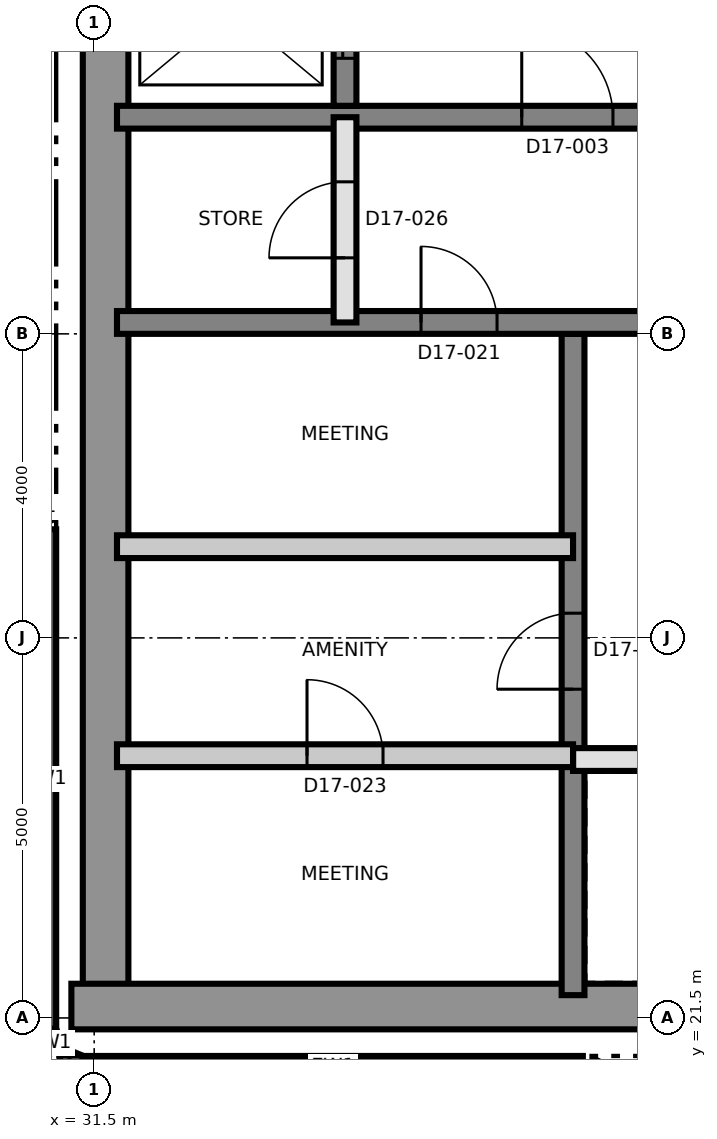
"""IFC4 building model, lengths in metres.
Left out: names, types, materials, properties, quantities, classifications, styles, units other than length and angle.
Written with IfcOpenShell. Run it as: python <this file> out.ifc"""

import sys

from ifc_helpers import new_model, si_unit, direction, frame, frame_2d, origin, place, context, subcontext, project, spatial, rectangle, extrude, element, fill, save


model = new_model("IFC4")
c1 = context("Model", 3, precision=1e-05, world=origin(), true_north=direction((0.0, 1.0)))
c2 = subcontext(c1, "Body", "Model", "MODEL_VIEW")
j1 = project(units=[si_unit("LENGTHUNIT", "METRE"), si_unit("PLANEANGLEUNIT", "RADIAN")], contexts=[c1])
p1 = place(None, origin())
s1 = spatial("IfcSite", under=j1, at=p1, CompositionType="ELEMENT")
p2 = place(p1, origin())
s2 = spatial("IfcBuilding", under=s1, at=p2, CompositionType="ELEMENT")
p3 = place(p2, frame((0.0, 0.0, 171.8)))
s3 = spatial("IfcBuildingStorey", under=s2, at=p3, CompositionType="ELEMENT", Elevation=171.8)
p4 = place(p3, frame((31.65, 21.8, 0.0), z_axis=(0.0, 0.0, 1.0), x_axis=(0.0, 1.0, 0.0)))
e1 = element("IfcWall", 1, at=p4, inside=s3, PredefinedType="SHEAR", context=c2, shape_type="SweptSolid", body=[
    extrude(rectangle(XDim=17.4, YDim=0.6, at=frame_2d((8.7, 0.0))), origin(), (0.0, 0.0, 1.0), 3.7),
])
p5 = place(p3, frame((31.2, 21.65, 0.0), z_axis=(0.0, 0.0, 1.0), x_axis=(1.0, 0.0, 0.0)))
e2 = element("IfcWall", 2, at=p5, inside=s3, PredefinedType="SHEAR", context=c2, shape_type="SweptSolid", body=[
    extrude(rectangle(XDim=27.0, YDim=0.6, at=frame_2d((13.5, 0.0))), origin(), (0.0, 0.0, 1.0), 3.7),
])
p6 = place(p3, frame((37.8, 21.8, 0.0), z_axis=(0.0, 0.0, 1.0), x_axis=(0.0, 1.0, 0.0)))
e3 = element("IfcWall", 3, at=p6, inside=s3, PredefinedType="SHEAR", context=c2, shape_type="SweptSolid", body=[
    extrude(rectangle(XDim=8.7, YDim=0.3, at=frame_2d((4.35, 0.0))), origin(), (0.0, 0.0, 1.0), 3.7),
])
p7 = place(p6, frame((4.025, 0.0, 0.0)))
e4 = element("IfcOpeningElement", 4, at=p7, cuts=e3, PredefinedType="OPENING", context=c2, shape_type="SweptSolid", body=[
    extrude(rectangle(XDim=1.0, YDim=2.1, at=frame_2d((0.5, 1.05))), frame((0.0, 0.16, 0.0), z_axis=(0.0, -1.0, 0.0), x_axis=(1.0, 0.0, 0.0)), (0.0, 0.0, 1.0), 0.32),
])
p8 = place(p3, frame((31.8, 30.65, 0.0), z_axis=(0.0, 0.0, 1.0), x_axis=(1.0, 0.0, 0.0)))
e5 = element("IfcWall", 5, at=p8, inside=s3, PredefinedType="SHEAR", context=c2, shape_type="SweptSolid", body=[
    extrude(rectangle(XDim=26.4, YDim=0.3, at=frame_2d((13.2, 0.0))), origin(), (0.0, 0.0, 1.0), 3.7),
])
p9 = place(p8, frame((24.7, 0.0, 0.0)))
e6 = element("IfcOpeningElement", 6, at=p9, cuts=e5, PredefinedType="OPENING", context=c2, shape_type="SweptSolid", body=[
    extrude(rectangle(XDim=1.0, YDim=2.1, at=frame_2d((0.5, 1.05))), frame((0.0, 0.16, 0.0), z_axis=(0.0, -1.0, 0.0), x_axis=(1.0, 0.0, 0.0)), (0.0, 0.0, 1.0), 0.32),
])
p10 = place(p8, frame((4.0, 0.0, 0.0)))
e7 = element("IfcOpeningElement", 7, at=p10, cuts=e5, PredefinedType="OPENING", context=c2, shape_type="SweptSolid", body=[
    extrude(rectangle(XDim=1.0, YDim=2.1, at=frame_2d((0.5, 1.05))), frame((0.0, 0.16, 0.0), z_axis=(0.0, -1.0, 0.0), x_axis=(1.0, 0.0, 0.0)), (0.0, 0.0, 1.0), 0.32),
])
p11 = place(p3, frame((31.8, 33.35, 0.0), z_axis=(0.0, 0.0, 1.0), x_axis=(1.0, 0.0, 0.0)))
e8 = element("IfcWall", 8, at=p11, inside=s3, PredefinedType="SHEAR", context=c2, shape_type="SweptSolid", body=[
    extrude(rectangle(XDim=26.4, YDim=0.3, at=frame_2d((13.2, 0.0))), origin(), (0.0, 0.0, 1.0), 3.7),
])
p12 = place(p11, frame((13.85, 0.0, 0.0)))
e9 = element("IfcOpeningElement", 9, at=p12, cuts=e8, PredefinedType="OPENING", context=c2, shape_type="SweptSolid", body=[
    extrude(rectangle(XDim=1.4, YDim=2.1, at=frame_2d((0.7, 1.05))), frame((0.0, 0.16, 0.0), z_axis=(0.0, -1.0, 0.0), x_axis=(1.0, 0.0, 0.0)), (0.0, 0.0, 1.0), 0.32),
])
p13 = place(p11, frame((5.325, 0.0, 0.0)))
e10 = element("IfcOpeningElement", 10, at=p13, cuts=e8, PredefinedType="OPENING", context=c2, shape_type="SweptSolid", body=[
    extrude(rectangle(XDim=1.2, YDim=2.1, at=frame_2d((0.6, 1.05))), frame((0.0, 0.16, 0.0), z_axis=(0.0, -1.0, 0.0), x_axis=(1.0, 0.0, 0.0)), (0.0, 0.0, 1.0), 0.32),
])
p14 = place(p11, frame((19.875, 0.0, 0.0)))
e11 = element("IfcOpeningElement", 11, at=p14, cuts=e8, PredefinedType="OPENING", context=c2, shape_type="SweptSolid", body=[
    extrude(rectangle(XDim=1.2, YDim=2.1, at=frame_2d((0.6, 1.05))), frame((0.0, 0.16, 0.0), z_axis=(0.0, -1.0, 0.0), x_axis=(1.0, 0.0, 0.0)), (0.0, 0.0, 1.0), 0.32),
])
p15 = place(p3, frame((34.8, 33.5, 0.0), z_axis=(0.0, 0.0, 1.0), x_axis=(0.0, 1.0, 0.0)))
e12 = element("IfcWall", 12, at=p15, inside=s3, PredefinedType="SHEAR", context=c2, shape_type="SweptSolid", body=[
    extrude(rectangle(XDim=2.55, YDim=0.3, at=frame_2d((1.275, 0.0))), origin(), (0.0, 0.0, 1.0), 3.7),
])
p16 = place(p15, frame((0.625, 0.0, 0.0)))
e13 = element("IfcOpeningElement", 13, at=p16, cuts=e12, PredefinedType="OPENING", context=c2, shape_type="SweptSolid", body=[
    extrude(rectangle(XDim=1.3, YDim=2.4, at=frame_2d((0.65, 1.2))), frame((0.0, 0.16, 0.0), z_axis=(0.0, -1.0, 0.0), x_axis=(1.0, 0.0, 0.0)), (0.0, 0.0, 1.0), 0.32),
])
p17 = place(p3, frame((30.85, 27.929, 0.0), z_axis=(0.0, 0.0, 1.0), x_axis=(0.0, -1.0, 0.0)))
e14 = element("IfcWall", 14, at=p17, inside=s3, PredefinedType="SOLIDWALL", context=c2, shape_type="SweptSolid", body=[
    extrude(rectangle(XDim=6.569, YDim=0.3, at=frame_2d((3.285, 0.0))), origin(), (0.0, 0.0, 1.0), 3.4),
])
for number, where, z_axis, x_axis in (
    (15, (30.861, 21.302, 0.0), (0.0, 0.0, 1.0), (0.383, -0.924, 0.0)),
    (16, (31.048, 20.967, 0.0), (0.0, 0.0, 1.0), (0.924, -0.383, 0.0)),
):
    element("IfcWall", number, at=place(p3, frame(where, z_axis=z_axis, x_axis=x_axis)), inside=s3, PredefinedType="SOLIDWALL", context=c2, shape_type="SweptSolid", body=[
        extrude(rectangle(XDim=0.275, YDim=0.3, at=frame_2d((0.138, 0.0))), origin(), (0.0, 0.0, 1.0), 3.4),
    ])
p18 = place(p3, frame((31.36, 20.85, 0.0), z_axis=(0.0, 0.0, 1.0), x_axis=(1.0, 0.0, 0.0)))
e17 = element("IfcWall", 17, at=p18, inside=s3, PredefinedType="SOLIDWALL", context=c2, shape_type="SweptSolid", body=[
    extrude(rectangle(XDim=6.569, YDim=0.3, at=frame_2d((3.285, 0.0))), origin(), (0.0, 0.0, 1.0), 3.4),
])
for number, where, z_axis, x_axis in (
    (18, (37.995, 20.834, 0.0), (0.0, 0.0, 1.0), (0.897, -0.442, 0.0)),
    (19, (30.613, 28.444, 0.0), (0.0, 0.0, 1.0), (0.442, -0.897, 0.0)),
):
    element("IfcWall", number, at=place(p3, frame(where, z_axis=z_axis, x_axis=x_axis)), inside=s3, PredefinedType="SOLIDWALL", context=c2, shape_type="SweptSolid", body=[
        extrude(rectangle(XDim=0.501, YDim=0.3, at=frame_2d((0.25, 0.0))), origin(), (0.0, 0.0, 1.0), 3.4),
    ])
p19 = place(p3, frame((37.8, 24.9, 0.0), z_axis=(0.0, 0.0, 1.0), x_axis=(1.0, 0.0, 0.0)))
e20 = element("IfcWall", 20, at=p19, inside=s3, PredefinedType="SOLIDWALL", context=c2, shape_type="SweptSolid", body=[
    extrude(rectangle(XDim=12.0, YDim=0.3, at=frame_2d((6.0, 0.0))), origin(), (0.0, 0.0, 1.0), 3.4),
])
p20 = place(p19, frame((1.05, 0.0, 0.0)))
e21 = element("IfcOpeningElement", 21, at=p20, cuts=e20, PredefinedType="OPENING", context=c2, shape_type="SweptSolid", body=[
    extrude(rectangle(XDim=0.9, YDim=2.1, at=frame_2d((0.45, 1.05))), frame((0.0, 0.16, 0.0), z_axis=(0.0, -1.0, 0.0), x_axis=(1.0, 0.0, 0.0)), (0.0, 0.0, 1.0), 0.32),
])
p21 = place(p19, frame((10.05, 0.0, 0.0)))
e22 = element("IfcOpeningElement", 22, at=p21, cuts=e20, PredefinedType="OPENING", context=c2, shape_type="SweptSolid", body=[
    extrude(rectangle(XDim=0.9, YDim=2.1, at=frame_2d((0.45, 1.05))), frame((0.0, 0.16, 0.0), z_axis=(0.0, -1.0, 0.0), x_axis=(1.0, 0.0, 0.0)), (0.0, 0.0, 1.0), 0.32),
])
p22 = place(p19, frame((3.95, 0.0, 0.0)))
e23 = element("IfcOpeningElement", 23, at=p22, cuts=e20, PredefinedType="OPENING", context=c2, shape_type="SweptSolid", body=[
    extrude(rectangle(XDim=1.1, YDim=2.4, at=frame_2d((0.55, 1.2))), frame((0.0, 0.16, 0.0), z_axis=(0.0, -1.0, 0.0), x_axis=(1.0, 0.0, 0.0)), (0.0, 0.0, 1.0), 0.32),
])
p23 = place(p19, frame((6.95, 0.0, 0.0)))
e24 = element("IfcOpeningElement", 24, at=p23, cuts=e20, PredefinedType="OPENING", context=c2, shape_type="SweptSolid", body=[
    extrude(rectangle(XDim=1.1, YDim=2.4, at=frame_2d((0.55, 1.2))), frame((0.0, 0.16, 0.0), z_axis=(0.0, -1.0, 0.0), x_axis=(1.0, 0.0, 0.0)), (0.0, 0.0, 1.0), 0.32),
])
p24 = place(p3, frame((31.8, 24.95, 0.0), z_axis=(0.0, 0.0, 1.0), x_axis=(1.0, 0.0, 0.0)))
e25 = element("IfcWall", 25, at=p24, inside=s3, PredefinedType="PARTITIONING", context=c2, shape_type="SweptSolid", body=[
    extrude(rectangle(XDim=6.0, YDim=0.3, at=frame_2d((3.0, 0.0))), origin(), (0.0, 0.0, 1.0), 3.4),
])
p25 = place(p24, frame((2.5, 0.0, 0.0)))
e26 = element("IfcOpeningElement", 26, at=p25, cuts=e25, PredefinedType="OPENING", context=c2, shape_type="SweptSolid", body=[
    extrude(rectangle(XDim=1.0, YDim=2.1, at=frame_2d((0.5, 1.05))), frame((0.0, 0.16, 0.0), z_axis=(0.0, -1.0, 0.0), x_axis=(1.0, 0.0, 0.0)), (0.0, 0.0, 1.0), 0.32),
])
p26 = place(p3, frame((31.8, 27.7, 0.0), z_axis=(0.0, 0.0, 1.0), x_axis=(1.0, 0.0, 0.0)))
e27 = element("IfcWall", 27, at=p26, inside=s3, PredefinedType="PARTITIONING", context=c2, shape_type="SweptSolid", body=[
    extrude(rectangle(XDim=6.0, YDim=0.3, at=frame_2d((3.0, 0.0))), origin(), (0.0, 0.0, 1.0), 3.4),
])
p27 = place(p3, frame((34.8, 30.65, 0.0), z_axis=(0.0, 0.0, 1.0), x_axis=(0.0, 1.0, 0.0)))
e28 = element("IfcWall", 28, at=p27, inside=s3, PredefinedType="SOLIDWALL", context=c2, shape_type="SweptSolid", body=[
    extrude(rectangle(XDim=2.7, YDim=0.3, at=frame_2d((1.35, 0.0))), origin(), (0.0, 0.0, 1.0), 3.4),
])
p28 = place(p27, frame((0.85, 0.0, 0.0)))
e29 = element("IfcOpeningElement", 29, at=p28, cuts=e28, PredefinedType="OPENING", context=c2, shape_type="SweptSolid", body=[
    extrude(rectangle(XDim=1.0, YDim=2.1, at=frame_2d((0.5, 1.05))), frame((0.0, 0.16, 0.0), z_axis=(0.0, -1.0, 0.0), x_axis=(1.0, 0.0, 0.0)), (0.0, 0.0, 1.0), 0.32),
])
p29 = place(p13, origin())
e30 = element("IfcDoor", 30, at=p29, inside=s3, OperationType="SINGLE_SWING_LEFT", PredefinedType="DOOR", context=c2, shape_type="SweptSolid", body=[
    extrude(rectangle(XDim=1.2, YDim=2.1, at=frame_2d((0.6, 1.05))), frame((0.0, 0.025, 0.0), z_axis=(0.0, -1.0, 0.0), x_axis=(1.0, 0.0, 0.0)), (0.0, 0.0, 1.0), 0.05),
])
fill(e10, e30)
p30 = place(p16, origin())
e31 = element("IfcDoor", 31, at=p30, inside=s3, OperationType="SLIDING_TO_LEFT", PredefinedType="DOOR", context=c2, shape_type="SweptSolid", body=[
    extrude(rectangle(XDim=1.3, YDim=2.4, at=frame_2d((0.65, 1.2))), frame((0.0, 0.025, 0.0), z_axis=(0.0, -1.0, 0.0), x_axis=(1.0, 0.0, 0.0)), (0.0, 0.0, 1.0), 0.05),
])
fill(e13, e31)
p31 = place(p10, origin())
e32 = element("IfcDoor", 32, at=p31, inside=s3, OperationType="SINGLE_SWING_LEFT", PredefinedType="DOOR", context=c2, shape_type="SweptSolid", body=[
    extrude(rectangle(XDim=1.0, YDim=2.1, at=frame_2d((0.5, 1.05))), frame((0.0, 0.025, 0.0), z_axis=(0.0, -1.0, 0.0), x_axis=(1.0, 0.0, 0.0)), (0.0, 0.0, 1.0), 0.05),
])
fill(e7, e32)
p32 = place(p7, origin())
e33 = element("IfcDoor", 33, at=p32, inside=s3, OperationType="SINGLE_SWING_RIGHT", PredefinedType="DOOR", context=c2, shape_type="SweptSolid", body=[
    extrude(rectangle(XDim=1.0, YDim=2.1, at=frame_2d((0.5, 1.05))), frame((0.0, 0.025, 0.0), z_axis=(0.0, -1.0, 0.0), x_axis=(1.0, 0.0, 0.0)), (0.0, 0.0, 1.0), 0.05),
])
fill(e4, e33)
p33 = place(p25, origin())
e34 = element("IfcDoor", 34, at=p33, inside=s3, OperationType="SINGLE_SWING_RIGHT", PredefinedType="DOOR", context=c2, shape_type="SweptSolid", body=[
    extrude(rectangle(XDim=1.0, YDim=2.1, at=frame_2d((0.5, 1.05))), frame((0.0, 0.025, 0.0), z_axis=(0.0, -1.0, 0.0), x_axis=(1.0, 0.0, 0.0)), (0.0, 0.0, 1.0), 0.05),
])
fill(e26, e34)
p34 = place(p28, origin())
e35 = element("IfcDoor", 35, at=p34, inside=s3, OperationType="SINGLE_SWING_RIGHT", PredefinedType="DOOR", context=c2, shape_type="SweptSolid", body=[
    extrude(rectangle(XDim=1.0, YDim=2.1, at=frame_2d((0.5, 1.05))), frame((0.0, 0.025, 0.0), z_axis=(0.0, -1.0, 0.0), x_axis=(1.0, 0.0, 0.0)), (0.0, 0.0, 1.0), 0.05),
])
fill(e29, e35)
save(model, sys.argv[1])
